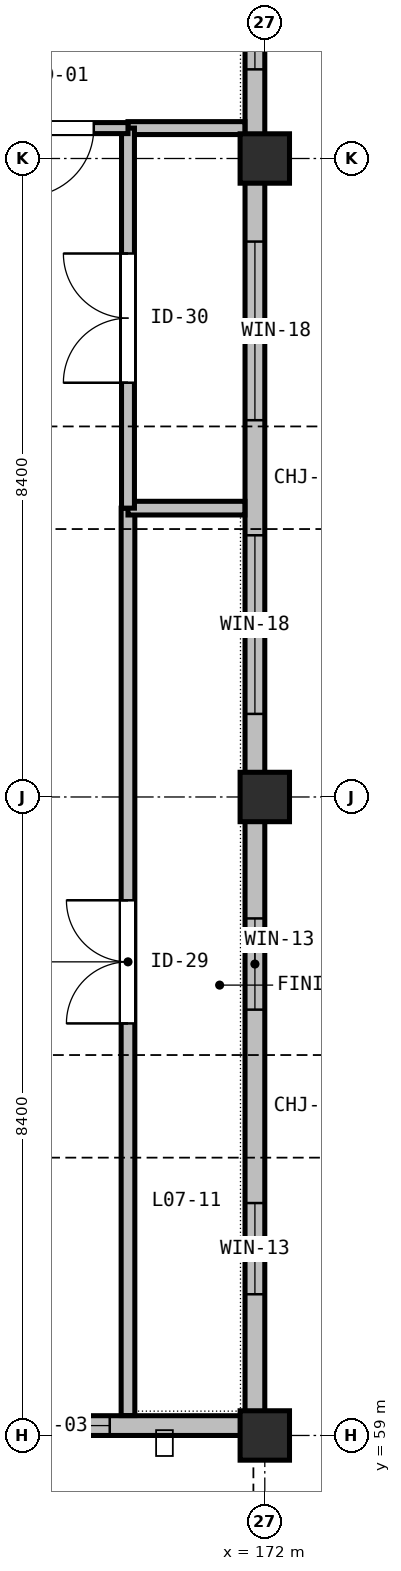
"""IFC4 building model, lengths in metres.
Left out: names, types, materials, properties, quantities, classifications, styles, units other than length and angle.
Written with IfcOpenShell. Run it as: python <this file> out.ifc"""

import sys

from ifc_helpers import new_model, si_unit, direction, frame, frame_2d, origin, origin_2d, place, context, subcontext, project, spatial, rectangle, extrude, element, fill, save


model = new_model("IFC4")
c1 = context("Model", 3, precision=1e-05, world=origin(), true_north=direction((0.0, 1.0)))
c2 = subcontext(c1, "Body", "Model", "MODEL_VIEW")
j1 = project(units=[si_unit("LENGTHUNIT", "METRE"), si_unit("PLANEANGLEUNIT", "RADIAN")], contexts=[c1])
p1 = place(None, origin())
s1 = spatial("IfcSite", under=j1, at=p1, CompositionType="ELEMENT")
p2 = place(p1, origin())
s2 = spatial("IfcBuilding", under=s1, at=p2, CompositionType="ELEMENT")
p3 = place(p2, frame((0.0, 0.0, 32.7)))
s3 = spatial("IfcBuildingStorey", under=s2, at=p3, CompositionType="ELEMENT", Elevation=32.7)
for number, where, z_axis, x_axis in (
    (1, (172.0, 59.0, 0.0), (0.0, 0.0, 1.0), (1.0, 0.0, 0.0)),
    (2, (172.0, 67.4, 0.0), (0.0, 0.0, 1.0), (1.0, 0.0, 0.0)),
    (3, (172.0, 75.8, 0.0), (0.0, 0.0, 1.0), (1.0, 0.0, 0.0)),
):
    element("IfcColumn", number, at=place(p3, frame(where, z_axis=z_axis, x_axis=x_axis)), inside=s3, PredefinedType="COLUMN", context=c2, shape_type="SweptSolid", body=[
        extrude(rectangle(XDim=0.65, YDim=0.65, at=origin_2d()), origin(), (0.0, 0.0, 1.0), 3.9),
    ])
p4 = place(p3, frame((171.87, 83.94, 0.0), z_axis=(0.0, 0.0, 1.0), x_axis=(0.0, -1.0, 0.0)))
e4 = element("IfcWall", 4, at=p4, inside=s3, PredefinedType="STANDARD", context=c2, shape_type="SweptSolid", body=[
    extrude(rectangle(XDim=8.14, YDim=0.26, at=frame_2d((4.07, 0.0))), origin(), (0.0, 0.0, 1.0), 3.285),
])
p5 = place(p4, frame((1.173, 0.0, 0.9)))
e5 = element("IfcOpeningElement", 5, at=p5, cuts=e4, PredefinedType="OPENING", context=c2, shape_type="SweptSolid", body=[
    extrude(rectangle(XDim=2.05, YDim=1.65, at=frame_2d((1.025, 0.825))), frame((0.0, 0.14, 0.0), z_axis=(0.0, -1.0, 0.0), x_axis=(1.0, 0.0, 0.0)), (0.0, 0.0, 1.0), 0.28),
])
p6 = place(p4, frame((4.917, 0.0, 0.9)))
e6 = element("IfcOpeningElement", 6, at=p6, cuts=e4, PredefinedType="OPENING", context=c2, shape_type="SweptSolid", body=[
    extrude(rectangle(XDim=2.05, YDim=1.65, at=frame_2d((1.025, 0.825))), frame((0.0, 0.14, 0.0), z_axis=(0.0, -1.0, 0.0), x_axis=(1.0, 0.0, 0.0)), (0.0, 0.0, 1.0), 0.28),
])
p7 = place(p3, frame((171.87, 75.8, 0.0), z_axis=(0.0, 0.0, 1.0), x_axis=(0.0, -1.0, 0.0)))
e7 = element("IfcWall", 7, at=p7, inside=s3, PredefinedType="STANDARD", context=c2, shape_type="SweptSolid", body=[
    extrude(rectangle(XDim=8.4, YDim=0.26, at=frame_2d((4.2, 0.0))), origin(), (0.0, 0.0, 1.0), 3.285),
])
p8 = place(p7, frame((1.093, 0.0, 0.9)))
e8 = element("IfcOpeningElement", 8, at=p8, cuts=e7, PredefinedType="OPENING", context=c2, shape_type="SweptSolid", body=[
    extrude(rectangle(XDim=2.35, YDim=1.5, at=frame_2d((1.175, 0.75))), frame((0.0, 0.14, 0.0), z_axis=(0.0, -1.0, 0.0), x_axis=(1.0, 0.0, 0.0)), (0.0, 0.0, 1.0), 0.28),
])
p9 = place(p7, frame((4.957, 0.0, 0.9)))
e9 = element("IfcOpeningElement", 9, at=p9, cuts=e7, PredefinedType="OPENING", context=c2, shape_type="SweptSolid", body=[
    extrude(rectangle(XDim=2.35, YDim=1.5, at=frame_2d((1.175, 0.75))), frame((0.0, 0.14, 0.0), z_axis=(0.0, -1.0, 0.0), x_axis=(1.0, 0.0, 0.0)), (0.0, 0.0, 1.0), 0.28),
])
p10 = place(p3, frame((171.87, 67.4, 0.0), z_axis=(0.0, 0.0, 1.0), x_axis=(0.0, -1.0, 0.0)))
e10 = element("IfcWall", 10, at=p10, inside=s3, PredefinedType="STANDARD", context=c2, shape_type="SweptSolid", body=[
    extrude(rectangle(XDim=8.14, YDim=0.26, at=frame_2d((4.07, 0.0))), origin(), (0.0, 0.0, 1.0), 3.285),
])
p11 = place(p10, frame((1.598, 0.0, 0.95)))
e11 = element("IfcOpeningElement", 11, at=p11, cuts=e10, PredefinedType="OPENING", context=c2, shape_type="SweptSolid", body=[
    extrude(rectangle(XDim=1.2, YDim=1.5, at=frame_2d((0.6, 0.75))), frame((0.0, 0.14, 0.0), z_axis=(0.0, -1.0, 0.0), x_axis=(1.0, 0.0, 0.0)), (0.0, 0.0, 1.0), 0.28),
])
p12 = place(p10, frame((5.342, 0.0, 0.95)))
e12 = element("IfcOpeningElement", 12, at=p12, cuts=e10, PredefinedType="OPENING", context=c2, shape_type="SweptSolid", body=[
    extrude(rectangle(XDim=1.2, YDim=1.5, at=frame_2d((0.6, 0.75))), frame((0.0, 0.14, 0.0), z_axis=(0.0, -1.0, 0.0), x_axis=(1.0, 0.0, 0.0)), (0.0, 0.0, 1.0), 0.28),
])
p13 = place(p3, frame((172.0, 59.13, 0.0), z_axis=(0.0, 0.0, 1.0), x_axis=(-1.0, 0.0, 0.0)))
e13 = element("IfcWall", 13, at=p13, inside=s3, PredefinedType="STANDARD", context=c2, shape_type="SweptSolid", body=[
    extrude(rectangle(XDim=6.8, YDim=0.26, at=frame_2d((3.4, 0.0))), origin(), (0.0, 0.0, 1.0), 3.185),
])
p14 = place(p13, frame((2.04, 0.0, 0.9)))
e14 = element("IfcOpeningElement", 14, at=p14, cuts=e13, PredefinedType="OPENING", context=c2, shape_type="SweptSolid", body=[
    extrude(rectangle(XDim=1.5, YDim=2.1, at=frame_2d((0.75, 1.05))), frame((0.0, 0.14, 0.0), z_axis=(0.0, -1.0, 0.0), x_axis=(1.0, 0.0, 0.0)), (0.0, 0.0, 1.0), 0.28),
])
p15 = place(p13, frame((4.214, 0.0, 0.9)))
e15 = element("IfcOpeningElement", 15, at=p15, cuts=e13, PredefinedType="OPENING", context=c2, shape_type="SweptSolid", body=[
    extrude(rectangle(XDim=1.5, YDim=2.1, at=frame_2d((0.75, 1.05))), frame((0.0, 0.14, 0.0), z_axis=(0.0, -1.0, 0.0), x_axis=(1.0, 0.0, 0.0)), (0.0, 0.0, 1.0), 0.28),
])
p16 = place(p3, frame((170.2, 59.262, 0.0), z_axis=(0.0, 0.0, 1.0), x_axis=(0.0, 1.0, 0.0)))
e16 = element("IfcWall", 16, at=p16, inside=s3, PredefinedType="PARTITIONING", context=c2, shape_type="SweptSolid", body=[
    extrude(rectangle(XDim=11.938, YDim=0.18, at=frame_2d((5.969, 0.0))), origin(), (0.0, 0.0, 1.0), 3.285),
])
p17 = place(p16, frame((5.159, 0.0, 0.0)))
e17 = element("IfcOpeningElement", 17, at=p17, cuts=e16, PredefinedType="OPENING", context=c2, shape_type="SweptSolid", body=[
    extrude(rectangle(XDim=1.62, YDim=2.14, at=frame_2d((0.81, 1.07))), frame((0.0, 0.1, 0.0), z_axis=(0.0, -1.0, 0.0), x_axis=(1.0, 0.0, 0.0)), (0.0, 0.0, 1.0), 0.2),
])
p18 = place(p3, frame((170.2, 71.2, 0.0), z_axis=(0.0, 0.0, 1.0), x_axis=(1.0, 0.0, 0.0)))
e18 = element("IfcWall", 18, at=p18, inside=s3, PredefinedType="PARTITIONING", context=c2, shape_type="SweptSolid", body=[
    extrude(rectangle(XDim=1.538, YDim=0.18, at=frame_2d((0.769, 0.0))), origin(), (0.0, 0.0, 1.0), 3.335),
])
p19 = place(p3, frame((170.2, 76.2, 0.0), z_axis=(0.0, 0.0, 1.0), x_axis=(1.0, 0.0, 0.0)))
e19 = element("IfcWall", 19, at=p19, inside=s3, PredefinedType="PARTITIONING", context=c2, shape_type="SweptSolid", body=[
    extrude(rectangle(XDim=1.538, YDim=0.17, at=frame_2d((0.769, 0.0))), origin(), (0.0, 0.0, 1.0), 3.335),
])
p20 = place(p3, frame((170.2, 71.2, 0.0), z_axis=(0.0, 0.0, 1.0), x_axis=(0.0, 1.0, 0.0)))
e20 = element("IfcWall", 20, at=p20, inside=s3, PredefinedType="PARTITIONING", context=c2, shape_type="SweptSolid", body=[
    extrude(rectangle(XDim=5.0, YDim=0.17, at=frame_2d((2.5, 0.0))), origin(), (0.0, 0.0, 1.0), 3.285),
])
p21 = place(p20, frame((1.65, 0.0, 0.0)))
e21 = element("IfcOpeningElement", 21, at=p21, cuts=e20, PredefinedType="OPENING", context=c2, shape_type="SweptSolid", body=[
    extrude(rectangle(XDim=1.7, YDim=2.14, at=frame_2d((0.85, 1.07))), frame((0.0, 0.095, 0.0), z_axis=(0.0, -1.0, 0.0), x_axis=(1.0, 0.0, 0.0)), (0.0, 0.0, 1.0), 0.19),
])
p22 = place(p3, frame((170.2, 76.2, 0.0), z_axis=(0.0, 0.0, 1.0), x_axis=(-1.0, 0.0, 0.0)))
e22 = element("IfcWall", 22, at=p22, inside=s3, PredefinedType="PARTITIONING", context=c2, shape_type="SweptSolid", body=[
    extrude(rectangle(XDim=1.8, YDim=0.145, at=frame_2d((0.9, 0.0))), origin(), (0.0, 0.0, 1.0), 3.435),
])
p23 = place(p22, frame((0.45, 0.0, 0.0)))
e23 = element("IfcOpeningElement", 23, at=p23, cuts=e22, PredefinedType="OPENING", context=c2, shape_type="SweptSolid", body=[
    extrude(rectangle(XDim=0.9, YDim=2.02, at=frame_2d((0.45, 1.01))), frame((0.0, 0.083, 0.0), z_axis=(0.0, -1.0, 0.0), x_axis=(1.0, 0.0, 0.0)), (0.0, 0.0, 1.0), 0.165),
])
p24 = place(p6, origin())
e24 = element("IfcWindow", 24, at=p24, inside=s3, PartitioningType="SINGLE_PANEL", PredefinedType="WINDOW", context=c2, shape_type="SweptSolid", body=[
    extrude(rectangle(XDim=2.05, YDim=1.65, at=frame_2d((1.025, 0.825))), frame((0.0, 0.03, 0.0), z_axis=(0.0, -1.0, 0.0), x_axis=(1.0, 0.0, 0.0)), (0.0, 0.0, 1.0), 0.06),
])
fill(e6, e24)
p25 = place(p8, origin())
e25 = element("IfcWindow", 25, at=p25, inside=s3, PartitioningType="SINGLE_PANEL", PredefinedType="WINDOW", context=c2, shape_type="SweptSolid", body=[
    extrude(rectangle(XDim=2.35, YDim=1.5, at=frame_2d((1.175, 0.75))), frame((0.0, 0.03, 0.0), z_axis=(0.0, -1.0, 0.0), x_axis=(1.0, 0.0, 0.0)), (0.0, 0.0, 1.0), 0.06),
])
fill(e8, e25)
p26 = place(p9, origin())
e26 = element("IfcWindow", 26, at=p26, inside=s3, PartitioningType="SINGLE_PANEL", PredefinedType="WINDOW", context=c2, shape_type="SweptSolid", body=[
    extrude(rectangle(XDim=2.35, YDim=1.5, at=frame_2d((1.175, 0.75))), frame((0.0, 0.03, 0.0), z_axis=(0.0, -1.0, 0.0), x_axis=(1.0, 0.0, 0.0)), (0.0, 0.0, 1.0), 0.06),
])
fill(e9, e26)
p27 = place(p11, origin())
e27 = element("IfcWindow", 27, at=p27, inside=s3, PartitioningType="SINGLE_PANEL", PredefinedType="WINDOW", context=c2, shape_type="SweptSolid", body=[
    extrude(rectangle(XDim=1.2, YDim=1.5, at=frame_2d((0.6, 0.75))), frame((0.0, 0.03, 0.0), z_axis=(0.0, -1.0, 0.0), x_axis=(1.0, 0.0, 0.0)), (0.0, 0.0, 1.0), 0.06),
])
fill(e11, e27)
p28 = place(p12, origin())
e28 = element("IfcWindow", 28, at=p28, inside=s3, PartitioningType="SINGLE_PANEL", PredefinedType="WINDOW", context=c2, shape_type="SweptSolid", body=[
    extrude(rectangle(XDim=1.2, YDim=1.5, at=frame_2d((0.6, 0.75))), frame((0.0, 0.03, 0.0), z_axis=(0.0, -1.0, 0.0), x_axis=(1.0, 0.0, 0.0)), (0.0, 0.0, 1.0), 0.06),
])
fill(e12, e28)
p29 = place(p14, origin())
e29 = element("IfcWindow", 29, at=p29, inside=s3, PartitioningType="SINGLE_PANEL", PredefinedType="WINDOW", context=c2, shape_type="SweptSolid", body=[
    extrude(rectangle(XDim=1.5, YDim=2.1, at=frame_2d((0.75, 1.05))), frame((0.0, 0.03, 0.0), z_axis=(0.0, -1.0, 0.0), x_axis=(1.0, 0.0, 0.0)), (0.0, 0.0, 1.0), 0.06),
])
fill(e14, e29)
p30 = place(p17, origin())
e30 = element("IfcDoor", 30, at=p30, inside=s3, OperationType="DOUBLE_DOOR_SINGLE_SWING", PredefinedType="DOOR", context=c2, shape_type="SweptSolid", body=[
    extrude(rectangle(XDim=1.62, YDim=2.14, at=frame_2d((0.81, 1.07))), frame((0.0, 0.025, 0.0), z_axis=(0.0, -1.0, 0.0), x_axis=(1.0, 0.0, 0.0)), (0.0, 0.0, 1.0), 0.05),
])
fill(e17, e30)
p31 = place(p21, origin())
e31 = element("IfcDoor", 31, at=p31, inside=s3, OperationType="DOUBLE_DOOR_SINGLE_SWING", PredefinedType="DOOR", context=c2, shape_type="SweptSolid", body=[
    extrude(rectangle(XDim=1.7, YDim=2.14, at=frame_2d((0.85, 1.07))), frame((0.0, 0.025, 0.0), z_axis=(0.0, -1.0, 0.0), x_axis=(1.0, 0.0, 0.0)), (0.0, 0.0, 1.0), 0.05),
])
fill(e21, e31)
p32 = place(p23, origin())
e32 = element("IfcDoor", 32, at=p32, inside=s3, OperationType="SINGLE_SWING_RIGHT", PredefinedType="DOOR", context=c2, shape_type="SweptSolid", body=[
    extrude(rectangle(XDim=0.9, YDim=2.02, at=frame_2d((0.45, 1.01))), frame((0.0, 0.025, 0.0), z_axis=(0.0, -1.0, 0.0), x_axis=(1.0, 0.0, 0.0)), (0.0, 0.0, 1.0), 0.05),
])
fill(e23, e32)
save(model, sys.argv[1])
